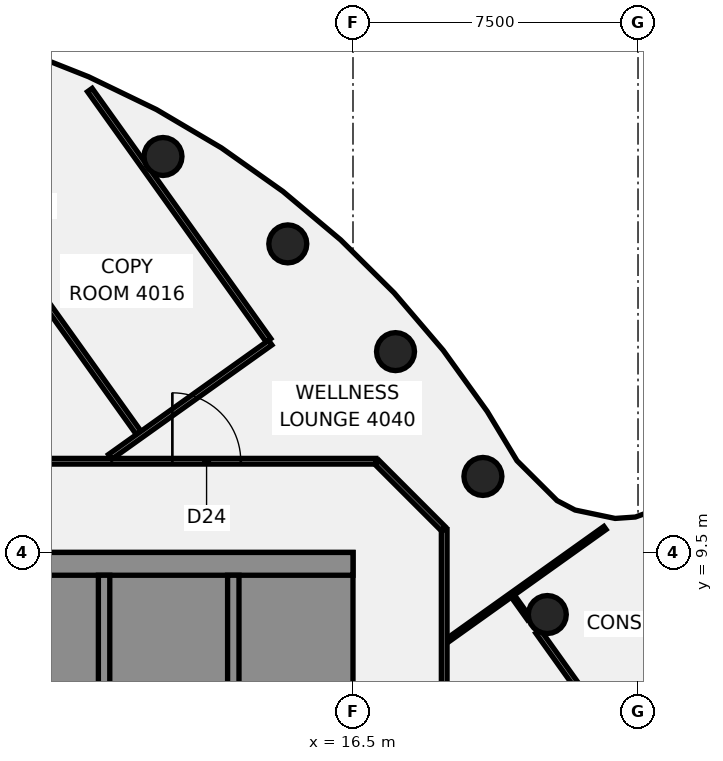
"""IFC4 building model, lengths in metres.
Left out: names, types, materials, properties, quantities, classifications, styles, units other than length and angle.
Written with IfcOpenShell. Run it as: python <this file> out.ifc"""

import sys

from ifc_helpers import new_model, si_unit, direction, frame, frame_2d, origin, origin_2d, place, context, subcontext, project, spatial, polyline, rectangle, circle, outline, extrude, element, fill, save


model = new_model("IFC4")
c1 = context("Model", 3, precision=1e-05, world=origin(), true_north=direction((0.0, 1.0)))
c2 = subcontext(c1, "Body", "Model", "MODEL_VIEW")
j1 = project(units=[si_unit("LENGTHUNIT", "METRE"), si_unit("PLANEANGLEUNIT", "RADIAN")], contexts=[c1])
p1 = place(None, origin())
s1 = spatial("IfcSite", under=j1, at=p1, CompositionType="ELEMENT")
p2 = place(p1, origin())
s2 = spatial("IfcBuilding", under=s1, at=p2, CompositionType="ELEMENT")
p3 = place(p2, frame((0.0, 0.0, 163.0)))
s3 = spatial("IfcBuildingStorey", under=s2, at=p3, CompositionType="ELEMENT", Elevation=163.0)
for number, where, z_axis, x_axis in (
    (1, (21.613, 7.866, -0.14), (0.0, 0.0, 1.0), (1.0, 0.0, 0.0)),
    (2, (19.919, 11.5, -0.14), (0.0, 0.0, 1.0), (1.0, 0.0, 0.0)),
    (3, (17.619, 14.784, -0.14), (0.0, 0.0, 1.0), (1.0, 0.0, 0.0)),
    (4, (14.784, 17.619, -0.14), (0.0, 0.0, 1.0), (1.0, 0.0, 0.0)),
    (5, (11.5, 19.919, -0.14), (0.0, 0.0, 1.0), (1.0, 0.0, 0.0)),
):
    element("IfcColumn", number, at=place(p3, frame(where, z_axis=z_axis, x_axis=x_axis)), inside=s3, PredefinedType="COLUMN", context=c2, shape_type="SweptSolid", body=[
        extrude(circle(Radius=0.5, at=origin_2d()), origin(), (0.0, 0.0, 1.0), 3.75),
    ])
p4 = place(p3, frame((3.937, 22.339, 0.0), z_axis=(0.0, 0.0, 1.0), x_axis=(0.581240132919, -0.813732086061, 0.0)))
e6 = element("IfcWall", 6, at=p4, inside=s3, PredefinedType="PARTITIONING", context=c2, shape_type="SweptSolid", body=[
    extrude(rectangle(XDim=11.909, YDim=0.15, at=frame_2d((5.955, 0.0))), origin(), (0.0, 0.0, 1.0), 3.01),
])
p5 = place(p4, frame((4.121, 0.0, 0.0)))
e7 = element("IfcOpeningElement", 7, at=p5, cuts=e6, PredefinedType="OPENING", context=c2, shape_type="SweptSolid", body=[
    extrude(rectangle(XDim=0.9, YDim=2.1, at=frame_2d((0.45, 1.05))), frame((0.0, 0.085, 0.0), z_axis=(0.0, -1.0, 0.0), x_axis=(1.0, 0.0, 0.0)), (0.0, 0.0, 1.0), 0.17),
])
p6 = place(p3, frame((9.575, 21.667, 0.0), z_axis=(0.0, 0.0, 1.0), x_axis=(0.581066903394, -0.813855794217, 0.0)))
e8 = element("IfcWall", 8, at=p6, inside=s3, PredefinedType="PARTITIONING", context=c2, shape_type="SweptSolid", body=[
    extrude(rectangle(XDim=8.09, YDim=0.15, at=frame_2d((4.045, 0.0))), origin(), (0.0, 0.0, 1.0), 3.01),
])
p7 = place(p3, frame((20.706, 8.352, 0.0), z_axis=(0.0, 0.0, 1.0), x_axis=(0.58101820206, -0.813890563206, 0.0)))
e9 = element("IfcWall", 9, at=p7, inside=s3, PredefinedType="PARTITIONING", context=c2, shape_type="SweptSolid", body=[
    extrude(rectangle(XDim=0.735, YDim=0.1, at=frame_2d((0.367, 0.0))), origin(), (0.0, 0.0, 1.0), 3.01),
])
p8 = place(p3, frame((21.371, 7.421, 0.0), z_axis=(0.0, 0.0, 1.0), x_axis=(0.581007311964, -0.813898337291, 0.0)))
e10 = element("IfcWall", 10, at=p8, inside=s3, PredefinedType="PARTITIONING", context=c2, shape_type="SweptSolid", body=[
    extrude(rectangle(XDim=13.105, YDim=0.15, at=frame_2d((6.552, 0.0))), origin(), (0.0, 0.0, 1.0), 3.01),
])
p9 = place(p8, frame((5.806, 0.0, 0.0)))
e11 = element("IfcOpeningElement", 11, at=p9, cuts=e10, PredefinedType="OPENING", context=c2, shape_type="SweptSolid", body=[
    extrude(rectangle(XDim=1.4, YDim=2.1, at=frame_2d((0.7, 1.05))), frame((0.0, 0.085, 0.0), z_axis=(0.0, -1.0, 0.0), x_axis=(1.0, 0.0, 0.0)), (0.0, 0.0, 1.0), 0.17),
])
p10 = place(p3, frame((17.128, 11.872, 0.0), z_axis=(0.0, 0.0, 1.0), x_axis=(0.707106781187, -0.707106781187, 0.0)))
e12 = element("IfcWall", 12, at=p10, inside=s3, PredefinedType="PARTITIONING", context=c2, shape_type="SweptSolid", body=[
    extrude(rectangle(XDim=2.465, YDim=0.15, at=frame_2d((1.232, 0.0))), origin(), (0.0, 0.0, 1.0), 3.01),
])
p11 = place(p3, frame((-17.065, 11.9, 0.0), z_axis=(0.0, 0.0, 1.0), x_axis=(1.0, 0.0, 0.0)))
e13 = element("IfcWall", 13, at=p11, inside=s3, PredefinedType="PARTITIONING", context=c2, shape_type="SweptSolid", body=[
    extrude(rectangle(XDim=34.165, YDim=0.15, at=frame_2d((17.083, 0.0))), origin(), (0.0, 0.0, 1.0), 3.01),
])
p12 = place(p11, frame((22.648, 0.0, 0.0)))
e14 = element("IfcOpeningElement", 14, at=p12, cuts=e13, PredefinedType="OPENING", context=c2, shape_type="SweptSolid", body=[
    extrude(rectangle(XDim=1.8, YDim=2.1, at=frame_2d((0.9, 1.05))), frame((0.0, 0.085, 0.0), z_axis=(0.0, -1.0, 0.0), x_axis=(1.0, 0.0, 0.0)), (0.0, 0.0, 1.0), 0.17),
])
p13 = place(p11, frame((28.812, 0.0, 0.0)))
e15 = element("IfcOpeningElement", 15, at=p13, cuts=e13, PredefinedType="OPENING", context=c2, shape_type="SweptSolid", body=[
    extrude(rectangle(XDim=1.8, YDim=2.1, at=frame_2d((0.9, 1.05))), frame((0.0, 0.085, 0.0), z_axis=(0.0, -1.0, 0.0), x_axis=(1.0, 0.0, 0.0)), (0.0, 0.0, 1.0), 0.17),
])
p14 = place(p11, frame((8.421, 0.0, 0.0)))
e16 = element("IfcOpeningElement", 16, at=p14, cuts=e13, PredefinedType="OPENING", context=c2, shape_type="SweptSolid", body=[
    extrude(rectangle(XDim=1.8, YDim=2.1, at=frame_2d((0.9, 1.05))), frame((0.0, 0.085, 0.0), z_axis=(0.0, -1.0, 0.0), x_axis=(1.0, 0.0, 0.0)), (0.0, 0.0, 1.0), 0.17),
])
p15 = place(p3, frame((10.11, 12.016, 0.0), z_axis=(0.0, 0.0, 1.0), x_axis=(0.81419877711, 0.580586213541, 0.0)))
e17 = element("IfcWall", 17, at=p15, inside=s3, PredefinedType="PARTITIONING", context=c2, shape_type="SweptSolid", body=[
    extrude(rectangle(XDim=5.173, YDim=0.15, at=frame_2d((2.586, 0.0))), origin(), (0.0, 0.0, 1.0), 3.01),
])
p16 = place(p3, frame((18.986, 7.186, 0.0), z_axis=(0.0, 0.0, 1.0), x_axis=(0.814008739191, 0.580852625474, 0.0)))
e18 = element("IfcWall", 18, at=p16, inside=s3, PredefinedType="PARTITIONING", context=c2, shape_type="SweptSolid", body=[
    extrude(rectangle(XDim=5.092, YDim=0.1, at=frame_2d((2.546, 0.0))), origin(), (0.0, 0.0, 1.0), 3.01),
])
p17 = place(p3, frame((18.9, -10.1, 0.0), z_axis=(0.0, 0.0, 1.0), x_axis=(0.0, 1.0, 0.0)))
e19 = element("IfcWall", 19, at=p17, inside=s3, PredefinedType="PARTITIONING", context=c2, shape_type="SweptSolid", body=[
    extrude(rectangle(XDim=20.2, YDim=0.15, at=frame_2d((10.1, 0.0))), origin(), (0.0, 0.0, 1.0), 3.01),
])
p18 = place(p17, frame((7.909, 0.0, 0.0)))
e20 = element("IfcOpeningElement", 20, at=p18, cuts=e19, PredefinedType="OPENING", context=c2, shape_type="SweptSolid", body=[
    extrude(rectangle(XDim=1.8, YDim=2.1, at=frame_2d((0.9, 1.05))), frame((0.0, 0.085, 0.0), z_axis=(0.0, -1.0, 0.0), x_axis=(1.0, 0.0, 0.0)), (0.0, 0.0, 1.0), 0.17),
])
p19 = place(p3, origin())
e21 = element("IfcWall", 21, at=p19, inside=s3, PredefinedType="SHEAR", context=c2, shape_type="SweptSolid", body=[
    extrude(outline(polyline([(13.5, -8.125), (13.5, -8.9), (15.9, -8.9), (16.5, -8.9), (16.5, 8.9), (15.9, 8.9), (13.5, 8.9), (13.5, 8.125), (15.9, 8.125), (15.9, 5.625), (13.5, 5.625), (13.5, 5.375), (15.9, 5.375), (15.9, -5.375), (13.5, -5.375), (13.5, -5.625), (15.9, -5.625), (15.9, -8.125), (13.5, -8.125)])), origin(), (0.0, 0.0, 1.0), 3.61),
])
p20 = place(p3, frame((16.5, 9.2, 0.0), z_axis=(0.0, 0.0, 1.0), x_axis=(-1.0, 0.0, 0.0)))
e22 = element("IfcWall", 22, at=p20, inside=s3, PredefinedType="SHEAR", context=c2, shape_type="SweptSolid", body=[
    extrude(rectangle(XDim=13.0, YDim=0.6, at=frame_2d((6.5, 0.0))), origin(), (0.0, 0.0, 1.0), 3.61),
])
p21 = place(p3, origin())
e23 = element("IfcWall", 23, at=p21, inside=s3, PredefinedType="SHEAR", context=c2, shape_type="SweptSolid", body=[
    extrude(outline(polyline([(9.8, -5.375), (7.5, -5.375), (7.5, -2.875), (9.8, -2.875), (9.8, -2.625), (7.5, -2.625), (7.5, -0.125), (9.8, -0.125), (9.8, 0.125), (7.5, 0.125), (7.5, 2.625), (9.8, 2.625), (9.8, 2.875), (7.5, 2.875), (7.5, 5.375), (9.8, 5.375), (9.8, 5.625), (7.5, 5.625), (7.5, 8.125), (9.8, 8.125), (9.8, 8.9), (7.5, 8.9), (7.2, 8.9), (7.2, -5.625), (7.5, -5.625), (9.8, -5.625), (9.8, -5.375)])), origin(), (0.0, 0.0, 1.0), 3.61),
])
p22 = place(p3, frame((13.35, -8.9, 0.0), z_axis=(0.0, 0.0, 1.0), x_axis=(0.0, 1.0, 0.0)))
e24 = element("IfcWall", 24, at=p22, inside=s3, PredefinedType="SHEAR", context=c2, shape_type="SweptSolid", body=[
    extrude(rectangle(XDim=17.8, YDim=0.3, at=frame_2d((8.9, 0.0))), origin(), (0.0, 0.0, 1.0), 3.61),
])
p23 = place(p22, frame((1.325, 0.0, 0.0)))
e25 = element("IfcOpeningElement", 25, at=p23, cuts=e24, PredefinedType="OPENING", context=c2, shape_type="SweptSolid", body=[
    extrude(rectangle(XDim=1.4, YDim=2.1, at=frame_2d((0.7, 1.05))), frame((0.0, 0.16, 0.0), z_axis=(0.0, -1.0, 0.0), x_axis=(1.0, 0.0, 0.0)), (0.0, 0.0, 1.0), 0.32),
])
p24 = place(p22, frame((4.754, 0.0, 0.0)))
e26 = element("IfcOpeningElement", 26, at=p24, cuts=e24, PredefinedType="OPENING", context=c2, shape_type="SweptSolid", body=[
    extrude(rectangle(XDim=1.0, YDim=2.1, at=frame_2d((0.5, 1.05))), frame((0.0, 0.16, 0.0), z_axis=(0.0, -1.0, 0.0), x_axis=(1.0, 0.0, 0.0)), (0.0, 0.0, 1.0), 0.32),
])
p25 = place(p22, frame((10.254, 0.0, 0.0)))
e27 = element("IfcOpeningElement", 27, at=p25, cuts=e24, PredefinedType="OPENING", context=c2, shape_type="SweptSolid", body=[
    extrude(rectangle(XDim=1.0, YDim=2.1, at=frame_2d((0.5, 1.05))), frame((0.0, 0.16, 0.0), z_axis=(0.0, -1.0, 0.0), x_axis=(1.0, 0.0, 0.0)), (0.0, 0.0, 1.0), 0.32),
])
p26 = place(p3, frame((9.95, -8.9, 0.0), z_axis=(0.0, 0.0, 1.0), x_axis=(0.0, 1.0, 0.0)))
e28 = element("IfcWall", 28, at=p26, inside=s3, PredefinedType="SHEAR", context=c2, shape_type="SweptSolid", body=[
    extrude(rectangle(XDim=17.8, YDim=0.3, at=frame_2d((8.9, 0.0))), origin(), (0.0, 0.0, 1.0), 3.61),
])
p27 = place(p26, frame((4.175, 0.0, 0.0)))
e29 = element("IfcOpeningElement", 29, at=p27, cuts=e28, PredefinedType="OPENING", context=c2, shape_type="SweptSolid", body=[
    extrude(rectangle(XDim=1.2, YDim=2.1, at=frame_2d((0.6, 1.05))), frame((0.0, 0.16, 0.0), z_axis=(0.0, -1.0, 0.0), x_axis=(1.0, 0.0, 0.0)), (0.0, 0.0, 1.0), 0.32),
])
p28 = place(p26, frame((6.925, 0.0, 0.0)))
e30 = element("IfcOpeningElement", 30, at=p28, cuts=e28, PredefinedType="OPENING", context=c2, shape_type="SweptSolid", body=[
    extrude(rectangle(XDim=1.2, YDim=2.1, at=frame_2d((0.6, 1.05))), frame((0.0, 0.16, 0.0), z_axis=(0.0, -1.0, 0.0), x_axis=(1.0, 0.0, 0.0)), (0.0, 0.0, 1.0), 0.32),
])
p29 = place(p13, origin())
e31 = element("IfcDoor", 31, at=p29, inside=s3, OperationType="DOUBLE_DOOR_SINGLE_SWING", PredefinedType="DOOR", context=c2, shape_type="SweptSolid", body=[
    extrude(rectangle(XDim=1.8, YDim=2.1, at=frame_2d((0.9, 1.05))), frame((0.0, 0.025, 0.0), z_axis=(0.0, -1.0, 0.0), x_axis=(1.0, 0.0, 0.0)), (0.0, 0.0, 1.0), 0.05),
])
fill(e15, e31)
save(model, sys.argv[1])
